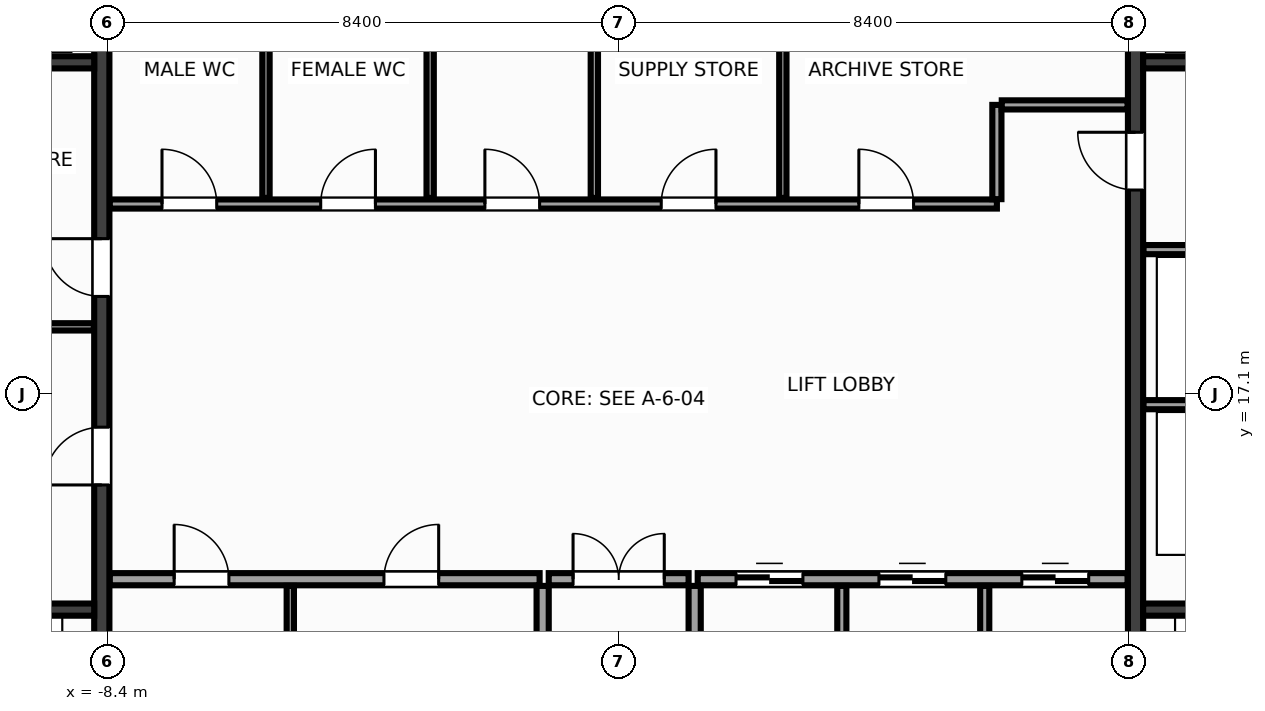
"""IFC4 building model, lengths in metres.
Left out: names, types, materials, properties, quantities, classifications, styles, units other than length and angle.
Written with IfcOpenShell. Run it as: python <this file> out.ifc"""

import sys

from ifc_helpers import new_model, si_unit, direction, frame, frame_2d, origin, place, context, subcontext, project, spatial, rectangle, extrude, source, transform, mapped, element, fill, save


model = new_model("IFC4")
c1 = context("Model", 3, precision=1e-05, world=origin(), true_north=direction((0.0, 1.0)))
c2 = subcontext(c1, "Body", "Model", "MODEL_VIEW")
j1 = project(units=[si_unit("LENGTHUNIT", "METRE"), si_unit("PLANEANGLEUNIT", "RADIAN")], contexts=[c1])
p1 = place(None, origin())
s1 = spatial("IfcSite", under=j1, at=p1, CompositionType="ELEMENT")
p2 = place(p1, origin())
s2 = spatial("IfcBuilding", under=s1, at=p2, CompositionType="ELEMENT")
p3 = place(p2, frame((0.0, 0.0, 92.0)))
s3 = spatial("IfcBuildingStorey", under=s2, at=p3, CompositionType="ELEMENT", Elevation=92.0)
m1 = source(origin(), c2, "Body", "SweptSolid", [
    extrude(rectangle(XDim=12.95, YDim=0.25, at=frame_2d((6.475, 0.0))), origin(), (0.0, 0.0, 1.0), 3.6),
])
p4 = place(p3, frame((-8.5, 10.525, 0.0), z_axis=(0.0, 0.0, 1.0), x_axis=(0.0, 1.0, 0.0)))
e1 = element("IfcWall", 1, at=p4, inside=s3, PredefinedType="SHEAR", context=c2, shape_type="MappedRepresentation", body=[
    mapped(m1, transform((0.0, 0.0, 0.0), x_axis=(1.0, 0.0, 0.0), y_axis=(0.0, 1.0, 0.0), z_axis=(0.0, 0.0, 1.0), scale=1.0)),
])
p5 = place(p4, frame((5.075, 0.0, 0.0)))
e2 = element("IfcOpeningElement", 2, at=p5, cuts=e1, PredefinedType="OPENING", context=c2, shape_type="SweptSolid", body=[
    extrude(rectangle(XDim=0.95, YDim=2.15, at=frame_2d((0.475, 1.075))), frame((0.0, 0.137, 0.0), z_axis=(0.0, -1.0, 0.0), x_axis=(1.0, 0.0, 0.0)), (0.0, 0.0, 1.0), 0.274),
])
p6 = place(p4, frame((8.175, 0.0, 0.0)))
e3 = element("IfcOpeningElement", 3, at=p6, cuts=e1, PredefinedType="OPENING", context=c2, shape_type="SweptSolid", body=[
    extrude(rectangle(XDim=0.95, YDim=2.15, at=frame_2d((0.475, 1.075))), frame((0.0, 0.137, 0.0), z_axis=(0.0, -1.0, 0.0), x_axis=(1.0, 0.0, 0.0)), (0.0, 0.0, 1.0), 0.274),
])
p7 = place(p3, frame((8.5, 10.525, 0.0), z_axis=(0.0, 0.0, 1.0), x_axis=(0.0, 1.0, 0.0)))
e4 = element("IfcWall", 4, at=p7, inside=s3, PredefinedType="SHEAR", context=c2, shape_type="MappedRepresentation", body=[
    mapped(m1, transform((0.0, 0.0, 0.0), x_axis=(1.0, 0.0, 0.0), y_axis=(0.0, 1.0, 0.0), z_axis=(0.0, 0.0, 1.0), scale=1.0)),
])
p8 = place(p7, frame((9.925, 0.0, 0.0)))
e5 = element("IfcOpeningElement", 5, at=p8, cuts=e4, PredefinedType="OPENING", context=c2, shape_type="SweptSolid", body=[
    extrude(rectangle(XDim=0.95, YDim=2.15, at=frame_2d((0.475, 1.075))), frame((0.0, 0.137, 0.0), z_axis=(0.0, -1.0, 0.0), x_axis=(1.0, 0.0, 0.0)), (0.0, 0.0, 1.0), 0.274),
])
m2 = source(origin(), c2, "Body", "SweptSolid", [
    extrude(rectangle(XDim=2.825, YDim=0.2, at=frame_2d((1.413, 0.0))), origin(), (0.0, 0.0, 1.0), 3.6),
])
for number, where, z_axis, x_axis in (
    (6, (-11.45, 13.55, 0.0), (0.0, 0.0, 1.0), (1.0, 0.0, 0.0)),
    (7, (8.625, 13.55, 0.0), (0.0, 0.0, 1.0), (1.0, 0.0, 0.0)),
):
    element("IfcWall", number, at=place(p3, frame(where, z_axis=z_axis, x_axis=x_axis)), inside=s3, PredefinedType="SHEAR", context=c2, shape_type="MappedRepresentation", body=[
        mapped(m2, transform((0.0, 0.0, 0.0), x_axis=(1.0, 0.0, 0.0), y_axis=(0.0, 1.0, 0.0), z_axis=(0.0, 0.0, 1.0), scale=1.0)),
    ])
m3 = source(origin(), c2, "Body", "SweptSolid", [
    extrude(rectangle(XDim=3.02, YDim=0.2, at=frame_2d((1.51, 0.0))), origin(), (0.0, 0.0, 1.0), 3.6),
])
for number, where, z_axis, x_axis in (
    (8, (-11.645, 22.55, 0.0), (0.0, 0.0, 1.0), (1.0, 0.0, 0.0)),
    (9, (8.625, 22.55, 0.0), (0.0, 0.0, 1.0), (1.0, 0.0, 0.0)),
):
    element("IfcWall", number, at=place(p3, frame(where, z_axis=z_axis, x_axis=x_axis)), inside=s3, PredefinedType="SHEAR", context=c2, shape_type="MappedRepresentation", body=[
        mapped(m3, transform((0.0, 0.0, 0.0), x_axis=(1.0, 0.0, 0.0), y_axis=(0.0, 1.0, 0.0), z_axis=(0.0, 0.0, 1.0), scale=1.0)),
    ])
m4 = source(origin(), c2, "Body", "SweptSolid", [
    extrude(rectangle(XDim=3.01, YDim=0.12, at=frame_2d((1.505, 0.0))), origin(), (0.0, 0.0, 1.0), 3.36),
])
p9 = place(p3, frame((-11.64, 18.2, 0.0), z_axis=(0.0, 0.0, 1.0), x_axis=(1.0, 0.0, 0.0)))
e10 = element("IfcWall", 10, at=p9, inside=s3, PredefinedType="PARTITIONING", context=c2, shape_type="MappedRepresentation", body=[
    mapped(m4, transform((0.0, 0.0, 0.0), x_axis=(1.0, 0.0, 0.0), y_axis=(0.0, 1.0, 0.0), z_axis=(0.0, 0.0, 1.0), scale=1.0)),
])
m5 = source(origin(), c2, "Body", "SweptSolid", [
    extrude(rectangle(XDim=3.01, YDim=0.15, at=frame_2d((1.505, 0.0))), origin(), (0.0, 0.0, 1.0), 3.36),
])
for number, where, z_axis, x_axis in (
    (11, (8.63, 16.92, 0.0), (0.0, 0.0, 1.0), (1.0, 0.0, 0.0)),
    (12, (8.63, 19.47, 0.0), (0.0, 0.0, 1.0), (1.0, 0.0, 0.0)),
):
    element("IfcWall", number, at=place(p3, frame(where, z_axis=z_axis, x_axis=x_axis)), inside=s3, PredefinedType="PARTITIONING", context=c2, shape_type="MappedRepresentation", body=[
        mapped(m5, transform((0.0, 0.0, 0.0), x_axis=(1.0, 0.0, 0.0), y_axis=(0.0, 1.0, 0.0), z_axis=(0.0, 0.0, 1.0), scale=1.0)),
    ])
m6 = source(origin(), c2, "Body", "SweptSolid", [
    extrude(rectangle(XDim=7.07, YDim=0.2, at=frame_2d((3.535, 0.0))), origin(), (0.0, 0.0, 1.0), 3.36),
])
p10 = place(p3, frame((-8.37, 14.05, 0.0), z_axis=(0.0, 0.0, 1.0), x_axis=(1.0, 0.0, 0.0)))
e13 = element("IfcWall", 13, at=p10, inside=s3, PredefinedType="PARTITIONING", context=c2, shape_type="MappedRepresentation", body=[
    mapped(m6, transform((0.0, 0.0, 0.0), x_axis=(1.0, 0.0, 0.0), y_axis=(0.0, 1.0, 0.0), z_axis=(0.0, 0.0, 1.0), scale=1.0)),
])
p11 = place(p10, frame((1.06, 0.0, 0.0)))
e14 = element("IfcOpeningElement", 14, at=p11, cuts=e13, PredefinedType="OPENING", context=c2, shape_type="SweptSolid", body=[
    extrude(rectangle(XDim=0.9, YDim=2.15, at=frame_2d((0.45, 1.075))), frame((0.0, 0.112, 0.0), z_axis=(0.0, -1.0, 0.0), x_axis=(1.0, 0.0, 0.0)), (0.0, 0.0, 1.0), 0.224),
])
p12 = place(p10, frame((4.51, 0.0, 0.0)))
e15 = element("IfcOpeningElement", 15, at=p12, cuts=e13, PredefinedType="OPENING", context=c2, shape_type="SweptSolid", body=[
    extrude(rectangle(XDim=0.9, YDim=2.15, at=frame_2d((0.45, 1.075))), frame((0.0, 0.112, 0.0), z_axis=(0.0, -1.0, 0.0), x_axis=(1.0, 0.0, 0.0)), (0.0, 0.0, 1.0), 0.224),
])
p13 = place(p3, frame((1.3, 14.05, 0.0), z_axis=(0.0, 0.0, 1.0), x_axis=(1.0, 0.0, 0.0)))
e16 = element("IfcWall", 16, at=p13, inside=s3, PredefinedType="PARTITIONING", context=c2, shape_type="MappedRepresentation", body=[
    mapped(m6, transform((0.0, 0.0, 0.0), x_axis=(1.0, 0.0, 0.0), y_axis=(0.0, 1.0, 0.0), z_axis=(0.0, 0.0, 1.0), scale=1.0)),
])
p14 = place(p13, frame((0.63, 0.0, 0.0)))
e17 = element("IfcOpeningElement", 17, at=p14, cuts=e16, PredefinedType="OPENING", context=c2, shape_type="SweptSolid", body=[
    extrude(rectangle(XDim=1.1, YDim=2.15, at=frame_2d((0.55, 1.075))), frame((0.0, 0.112, 0.0), z_axis=(0.0, -1.0, 0.0), x_axis=(1.0, 0.0, 0.0)), (0.0, 0.0, 1.0), 0.224),
])
p15 = place(p13, frame((2.98, 0.0, 0.0)))
e18 = element("IfcOpeningElement", 18, at=p15, cuts=e16, PredefinedType="OPENING", context=c2, shape_type="SweptSolid", body=[
    extrude(rectangle(XDim=1.1, YDim=2.15, at=frame_2d((0.55, 1.075))), frame((0.0, 0.112, 0.0), z_axis=(0.0, -1.0, 0.0), x_axis=(1.0, 0.0, 0.0)), (0.0, 0.0, 1.0), 0.224),
])
p16 = place(p13, frame((5.33, 0.0, 0.0)))
e19 = element("IfcOpeningElement", 19, at=p16, cuts=e16, PredefinedType="OPENING", context=c2, shape_type="SweptSolid", body=[
    extrude(rectangle(XDim=1.1, YDim=2.15, at=frame_2d((0.55, 1.075))), frame((0.0, 0.112, 0.0), z_axis=(0.0, -1.0, 0.0), x_axis=(1.0, 0.0, 0.0)), (0.0, 0.0, 1.0), 0.224),
])
m7 = source(origin(), c2, "Body", "SweptSolid", [
    extrude(rectangle(XDim=3.415, YDim=0.2, at=frame_2d((1.708, 0.0))), origin(), (0.0, 0.0, 1.0), 3.36),
])
for number, where, z_axis, x_axis in (
    (20, (-1.25, 10.525, 0.0), (0.0, 0.0, 1.0), (0.0, 1.0, 0.0)),
    (21, (1.25, 10.525, 0.0), (0.0, 0.0, 1.0), (0.0, 1.0, 0.0)),
):
    element("IfcWall", number, at=place(p3, frame(where, z_axis=z_axis, x_axis=x_axis)), inside=s3, PredefinedType="PARTITIONING", context=c2, shape_type="MappedRepresentation", body=[
        mapped(m7, transform((0.0, 0.0, 0.0), x_axis=(1.0, 0.0, 0.0), y_axis=(0.0, 1.0, 0.0), z_axis=(0.0, 0.0, 1.0), scale=1.0)),
    ])
m8 = source(origin(), c2, "Body", "SweptSolid", [
    extrude(rectangle(XDim=2.3, YDim=0.2, at=frame_2d((1.15, 0.0))), origin(), (0.0, 0.0, 1.0), 3.36),
])
p17 = place(p3, frame((-1.15, 14.05, 0.0), z_axis=(0.0, 0.0, 1.0), x_axis=(1.0, 0.0, 0.0)))
e22 = element("IfcWall", 22, at=p17, inside=s3, PredefinedType="PARTITIONING", context=c2, shape_type="MappedRepresentation", body=[
    mapped(m8, transform((0.0, 0.0, 0.0), x_axis=(1.0, 0.0, 0.0), y_axis=(0.0, 1.0, 0.0), z_axis=(0.0, 0.0, 1.0), scale=1.0)),
])
p18 = place(p17, frame((0.4, 0.0, 0.0)))
e23 = element("IfcOpeningElement", 23, at=p18, cuts=e22, PredefinedType="OPENING", context=c2, shape_type="SweptSolid", body=[
    extrude(rectangle(XDim=1.5, YDim=2.2, at=frame_2d((0.75, 1.1))), frame((0.0, 0.112, 0.0), z_axis=(0.0, -1.0, 0.0), x_axis=(1.0, 0.0, 0.0)), (0.0, 0.0, 1.0), 0.224),
])
m9 = source(origin(), c2, "Body", "SweptSolid", [
    extrude(rectangle(XDim=14.59, YDim=0.15, at=frame_2d((7.295, 0.0))), origin(), (0.0, 0.0, 1.0), 3.36),
])
p19 = place(p3, frame((-8.37, 20.22, 0.0), z_axis=(0.0, 0.0, 1.0), x_axis=(1.0, 0.0, 0.0)))
e24 = element("IfcWall", 24, at=p19, inside=s3, PredefinedType="PARTITIONING", context=c2, shape_type="MappedRepresentation", body=[
    mapped(m9, transform((0.0, 0.0, 0.0), x_axis=(1.0, 0.0, 0.0), y_axis=(0.0, 1.0, 0.0), z_axis=(0.0, 0.0, 1.0), scale=1.0)),
])
p20 = place(p19, frame((0.86, 0.0, 0.0)))
e25 = element("IfcOpeningElement", 25, at=p20, cuts=e24, PredefinedType="OPENING", context=c2, shape_type="SweptSolid", body=[
    extrude(rectangle(XDim=0.9, YDim=2.15, at=frame_2d((0.45, 1.075))), frame((0.0, 0.087, 0.0), z_axis=(0.0, -1.0, 0.0), x_axis=(1.0, 0.0, 0.0)), (0.0, 0.0, 1.0), 0.174),
])
p21 = place(p19, frame((3.47, 0.0, 0.0)))
e26 = element("IfcOpeningElement", 26, at=p21, cuts=e24, PredefinedType="OPENING", context=c2, shape_type="SweptSolid", body=[
    extrude(rectangle(XDim=0.9, YDim=2.15, at=frame_2d((0.45, 1.075))), frame((0.0, 0.087, 0.0), z_axis=(0.0, -1.0, 0.0), x_axis=(1.0, 0.0, 0.0)), (0.0, 0.0, 1.0), 0.174),
])
p22 = place(p19, frame((6.17, 0.0, 0.0)))
e27 = element("IfcOpeningElement", 27, at=p22, cuts=e24, PredefinedType="OPENING", context=c2, shape_type="SweptSolid", body=[
    extrude(rectangle(XDim=0.9, YDim=2.15, at=frame_2d((0.45, 1.075))), frame((0.0, 0.087, 0.0), z_axis=(0.0, -1.0, 0.0), x_axis=(1.0, 0.0, 0.0)), (0.0, 0.0, 1.0), 0.174),
])
p23 = place(p19, frame((9.07, 0.0, 0.0)))
e28 = element("IfcOpeningElement", 28, at=p23, cuts=e24, PredefinedType="OPENING", context=c2, shape_type="SweptSolid", body=[
    extrude(rectangle(XDim=0.9, YDim=2.15, at=frame_2d((0.45, 1.075))), frame((0.0, 0.087, 0.0), z_axis=(0.0, -1.0, 0.0), x_axis=(1.0, 0.0, 0.0)), (0.0, 0.0, 1.0), 0.174),
])
p24 = place(p19, frame((12.32, 0.0, 0.0)))
e29 = element("IfcOpeningElement", 29, at=p24, cuts=e24, PredefinedType="OPENING", context=c2, shape_type="SweptSolid", body=[
    extrude(rectangle(XDim=0.9, YDim=2.15, at=frame_2d((0.45, 1.075))), frame((0.0, 0.087, 0.0), z_axis=(0.0, -1.0, 0.0), x_axis=(1.0, 0.0, 0.0)), (0.0, 0.0, 1.0), 0.174),
])
m10 = source(origin(), c2, "Body", "SweptSolid", [
    extrude(rectangle(XDim=1.55, YDim=0.15, at=frame_2d((0.775, 0.0))), origin(), (0.0, 0.0, 1.0), 3.36),
])
p25 = place(p3, frame((6.22, 20.3, 0.0), z_axis=(0.0, 0.0, 1.0), x_axis=(0.0, 1.0, 0.0)))
e30 = element("IfcWall", 30, at=p25, inside=s3, PredefinedType="PARTITIONING", context=c2, shape_type="MappedRepresentation", body=[
    mapped(m10, transform((0.0, 0.0, 0.0), x_axis=(1.0, 0.0, 0.0), y_axis=(0.0, 1.0, 0.0), z_axis=(0.0, 0.0, 1.0), scale=1.0)),
])
m11 = source(origin(), c2, "Body", "SweptSolid", [
    extrude(rectangle(XDim=2.07, YDim=0.15, at=frame_2d((1.035, 0.0))), origin(), (0.0, 0.0, 1.0), 3.36),
])
p26 = place(p3, frame((6.3, 21.85, 0.0), z_axis=(0.0, 0.0, 1.0), x_axis=(1.0, 0.0, 0.0)))
e31 = element("IfcWall", 31, at=p26, inside=s3, PredefinedType="PARTITIONING", context=c2, shape_type="MappedRepresentation", body=[
    mapped(m11, transform((0.0, 0.0, 0.0), x_axis=(1.0, 0.0, 0.0), y_axis=(0.0, 1.0, 0.0), z_axis=(0.0, 0.0, 1.0), scale=1.0)),
])
m12 = source(origin(), c2, "Body", "SweptSolid", [
    extrude(rectangle(XDim=3.415, YDim=0.12, at=frame_2d((1.708, 0.0))), origin(), (0.0, 0.0, 1.0), 3.36),
])
p27 = place(p3, frame((-5.4, 10.525, 0.0), z_axis=(0.0, 0.0, 1.0), x_axis=(0.0, 1.0, 0.0)))
e32 = element("IfcWall", 32, at=p27, inside=s3, PredefinedType="PARTITIONING", context=c2, shape_type="MappedRepresentation", body=[
    mapped(m12, transform((0.0, 0.0, 0.0), x_axis=(1.0, 0.0, 0.0), y_axis=(0.0, 1.0, 0.0), z_axis=(0.0, 0.0, 1.0), scale=1.0)),
])
m13 = source(origin(), c2, "Body", "SweptSolid", [
    extrude(rectangle(XDim=3.415, YDim=0.15, at=frame_2d((1.708, 0.0))), origin(), (0.0, 0.0, 1.0), 3.36),
])
for number, where, z_axis, x_axis in (
    (33, (3.67, 10.525, 0.0), (0.0, 0.0, 1.0), (0.0, 1.0, 0.0)),
    (34, (6.02, 10.525, 0.0), (0.0, 0.0, 1.0), (0.0, 1.0, 0.0)),
):
    element("IfcWall", number, at=place(p3, frame(where, z_axis=z_axis, x_axis=x_axis)), inside=s3, PredefinedType="PARTITIONING", context=c2, shape_type="MappedRepresentation", body=[
        mapped(m13, transform((0.0, 0.0, 0.0), x_axis=(1.0, 0.0, 0.0), y_axis=(0.0, 1.0, 0.0), z_axis=(0.0, 0.0, 1.0), scale=1.0)),
    ])
m14 = source(origin(), c2, "Body", "SweptSolid", [
    extrude(rectangle(XDim=3.115, YDim=0.12, at=frame_2d((1.558, 0.0))), origin(), (0.0, 0.0, 1.0), 3.36),
])
for number, where, z_axis, x_axis in (
    (35, (-5.8, 20.32, 0.0), (0.0, 0.0, 1.0), (0.0, 1.0, 0.0)),
    (36, (-3.1, 20.32, 0.0), (0.0, 0.0, 1.0), (0.0, 1.0, 0.0)),
    (37, (-0.4, 20.32, 0.0), (0.0, 0.0, 1.0), (0.0, 1.0, 0.0)),
    (38, (2.7, 20.32, 0.0), (0.0, 0.0, 1.0), (0.0, 1.0, 0.0)),
):
    element("IfcWall", number, at=place(p3, frame(where, z_axis=z_axis, x_axis=x_axis)), inside=s3, PredefinedType="PARTITIONING", context=c2, shape_type="MappedRepresentation", body=[
        mapped(m14, transform((0.0, 0.0, 0.0), x_axis=(1.0, 0.0, 0.0), y_axis=(0.0, 1.0, 0.0), z_axis=(0.0, 0.0, 1.0), scale=1.0)),
    ])
m15 = source(origin(), c2, "Body", "SweptSolid", [
    extrude(rectangle(XDim=0.95, YDim=2.15, at=frame_2d((0.475, 1.075))), frame((0.0, 0.025, 0.0), z_axis=(0.0, -1.0, 0.0), x_axis=(1.0, 0.0, 0.0)), (0.0, 0.0, 1.0), 0.05),
])
p28 = place(p5, origin())
e39 = element("IfcDoor", 39, at=p28, inside=s3, OperationType="SINGLE_SWING_LEFT", PredefinedType="DOOR", context=c2, shape_type="MappedRepresentation", body=[
    mapped(m15, transform((0.0, 0.0, 0.0), x_axis=(1.0, 0.0, 0.0), y_axis=(0.0, 1.0, 0.0), z_axis=(0.0, 0.0, 1.0), scale=1.0)),
])
fill(e2, e39)
p29 = place(p6, origin())
e40 = element("IfcDoor", 40, at=p29, inside=s3, OperationType="SINGLE_SWING_RIGHT", PredefinedType="DOOR", context=c2, shape_type="MappedRepresentation", body=[
    mapped(m15, transform((0.0, 0.0, 0.0), x_axis=(1.0, 0.0, 0.0), y_axis=(0.0, 1.0, 0.0), z_axis=(0.0, 0.0, 1.0), scale=1.0)),
])
fill(e3, e40)
m16 = source(origin(), c2, "Body", "SweptSolid", [
    extrude(rectangle(XDim=0.95, YDim=2.15, at=frame_2d((0.475, 1.075))), frame((0.0, 0.025, 0.0), z_axis=(0.0, -1.0, 0.0), x_axis=(1.0, 0.0, 0.0)), (0.0, 0.0, 1.0), 0.05),
])
p30 = place(p8, origin())
e41 = element("IfcDoor", 41, at=p30, inside=s3, OperationType="SINGLE_SWING_RIGHT", PredefinedType="DOOR", context=c2, shape_type="MappedRepresentation", body=[
    mapped(m16, transform((0.0, 0.0, 0.0), x_axis=(1.0, 0.0, 0.0), y_axis=(0.0, 1.0, 0.0), z_axis=(0.0, 0.0, 1.0), scale=1.0)),
])
fill(e5, e41)
m17 = source(origin(), c2, "Body", "SweptSolid", [
    extrude(rectangle(XDim=0.9, YDim=2.15, at=frame_2d((0.45, 1.075))), frame((0.0, 0.025, 0.0), z_axis=(0.0, -1.0, 0.0), x_axis=(1.0, 0.0, 0.0)), (0.0, 0.0, 1.0), 0.05),
])
p31 = place(p11, origin())
e42 = element("IfcDoor", 42, at=p31, inside=s3, OperationType="SINGLE_SWING_LEFT", PredefinedType="DOOR", context=c2, shape_type="MappedRepresentation", body=[
    mapped(m17, transform((0.0, 0.0, 0.0), x_axis=(1.0, 0.0, 0.0), y_axis=(0.0, 1.0, 0.0), z_axis=(0.0, 0.0, 1.0), scale=1.0)),
])
fill(e14, e42)
p32 = place(p12, origin())
e43 = element("IfcDoor", 43, at=p32, inside=s3, OperationType="SINGLE_SWING_RIGHT", PredefinedType="DOOR", context=c2, shape_type="MappedRepresentation", body=[
    mapped(m17, transform((0.0, 0.0, 0.0), x_axis=(1.0, 0.0, 0.0), y_axis=(0.0, 1.0, 0.0), z_axis=(0.0, 0.0, 1.0), scale=1.0)),
])
fill(e15, e43)
m18 = source(origin(), c2, "Body", "SweptSolid", [
    extrude(rectangle(XDim=1.1, YDim=2.15, at=frame_2d((0.55, 1.075))), frame((0.0, 0.025, 0.0), z_axis=(0.0, -1.0, 0.0), x_axis=(1.0, 0.0, 0.0)), (0.0, 0.0, 1.0), 0.05),
])
p33 = place(p14, origin())
e44 = element("IfcDoor", 44, at=p33, inside=s3, OperationType="DOUBLE_DOOR_SLIDING", PredefinedType="DOOR", context=c2, shape_type="MappedRepresentation", body=[
    mapped(m18, transform((0.0, 0.0, 0.0), x_axis=(1.0, 0.0, 0.0), y_axis=(0.0, 1.0, 0.0), z_axis=(0.0, 0.0, 1.0), scale=1.0)),
])
fill(e17, e44)
p34 = place(p15, origin())
e45 = element("IfcDoor", 45, at=p34, inside=s3, OperationType="DOUBLE_DOOR_SLIDING", PredefinedType="DOOR", context=c2, shape_type="MappedRepresentation", body=[
    mapped(m18, transform((0.0, 0.0, 0.0), x_axis=(1.0, 0.0, 0.0), y_axis=(0.0, 1.0, 0.0), z_axis=(0.0, 0.0, 1.0), scale=1.0)),
])
fill(e18, e45)
p35 = place(p16, origin())
e46 = element("IfcDoor", 46, at=p35, inside=s3, OperationType="DOUBLE_DOOR_SLIDING", PredefinedType="DOOR", context=c2, shape_type="MappedRepresentation", body=[
    mapped(m18, transform((0.0, 0.0, 0.0), x_axis=(1.0, 0.0, 0.0), y_axis=(0.0, 1.0, 0.0), z_axis=(0.0, 0.0, 1.0), scale=1.0)),
])
fill(e19, e46)
m19 = source(origin(), c2, "Body", "SweptSolid", [
    extrude(rectangle(XDim=1.5, YDim=2.2, at=frame_2d((0.75, 1.1))), frame((0.0, 0.025, 0.0), z_axis=(0.0, -1.0, 0.0), x_axis=(1.0, 0.0, 0.0)), (0.0, 0.0, 1.0), 0.05),
])
p36 = place(p18, origin())
e47 = element("IfcDoor", 47, at=p36, inside=s3, OperationType="DOUBLE_DOOR_SINGLE_SWING", PredefinedType="DOOR", context=c2, shape_type="MappedRepresentation", body=[
    mapped(m19, transform((0.0, 0.0, 0.0), x_axis=(1.0, 0.0, 0.0), y_axis=(0.0, 1.0, 0.0), z_axis=(0.0, 0.0, 1.0), scale=1.0)),
])
fill(e23, e47)
p37 = place(p20, origin())
e48 = element("IfcDoor", 48, at=p37, inside=s3, OperationType="SINGLE_SWING_LEFT", PredefinedType="DOOR", context=c2, shape_type="MappedRepresentation", body=[
    mapped(m17, transform((0.0, 0.0, 0.0), x_axis=(1.0, 0.0, 0.0), y_axis=(0.0, 1.0, 0.0), z_axis=(0.0, 0.0, 1.0), scale=1.0)),
])
fill(e25, e48)
p38 = place(p21, origin())
e49 = element("IfcDoor", 49, at=p38, inside=s3, OperationType="SINGLE_SWING_RIGHT", PredefinedType="DOOR", context=c2, shape_type="MappedRepresentation", body=[
    mapped(m17, transform((0.0, 0.0, 0.0), x_axis=(1.0, 0.0, 0.0), y_axis=(0.0, 1.0, 0.0), z_axis=(0.0, 0.0, 1.0), scale=1.0)),
])
fill(e26, e49)
p39 = place(p22, origin())
e50 = element("IfcDoor", 50, at=p39, inside=s3, OperationType="SINGLE_SWING_LEFT", PredefinedType="DOOR", context=c2, shape_type="MappedRepresentation", body=[
    mapped(m17, transform((0.0, 0.0, 0.0), x_axis=(1.0, 0.0, 0.0), y_axis=(0.0, 1.0, 0.0), z_axis=(0.0, 0.0, 1.0), scale=1.0)),
])
fill(e27, e50)
p40 = place(p23, origin())
e51 = element("IfcDoor", 51, at=p40, inside=s3, OperationType="SINGLE_SWING_RIGHT", PredefinedType="DOOR", context=c2, shape_type="MappedRepresentation", body=[
    mapped(m17, transform((0.0, 0.0, 0.0), x_axis=(1.0, 0.0, 0.0), y_axis=(0.0, 1.0, 0.0), z_axis=(0.0, 0.0, 1.0), scale=1.0)),
])
fill(e28, e51)
p41 = place(p24, origin())
e52 = element("IfcDoor", 52, at=p41, inside=s3, OperationType="SINGLE_SWING_LEFT", PredefinedType="DOOR", context=c2, shape_type="MappedRepresentation", body=[
    mapped(m17, transform((0.0, 0.0, 0.0), x_axis=(1.0, 0.0, 0.0), y_axis=(0.0, 1.0, 0.0), z_axis=(0.0, 0.0, 1.0), scale=1.0)),
])
fill(e29, e52)
save(model, sys.argv[1])
